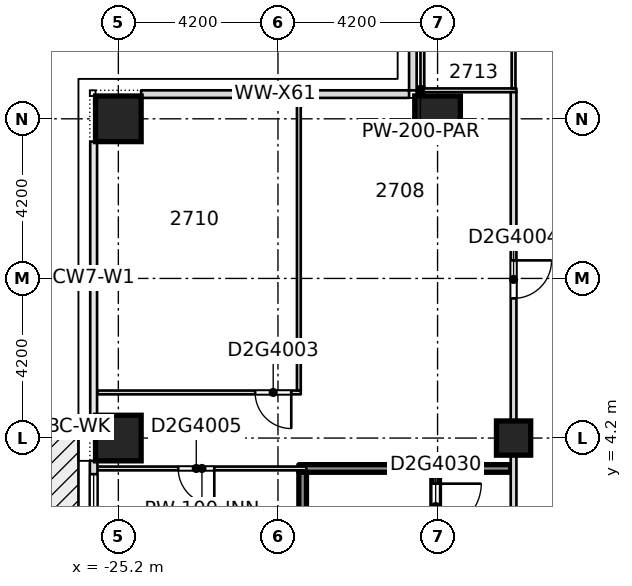
"""IFC4 building model, lengths in metres.
Left out: names, types, materials, properties, quantities, classifications, styles, units other than length and angle.
Written with IfcOpenShell. Run it as: python <this file> out.ifc"""

import sys

from ifc_helpers import new_model, si_unit, direction, frame, frame_2d, origin, origin_2d, place, context, subcontext, project, spatial, rectangle, extrude, element, fill, save


model = new_model("IFC4")
c1 = context("Model", 3, precision=1e-05, world=origin(), true_north=direction((0.0, 1.0)))
c2 = subcontext(c1, "Body", "Model", "MODEL_VIEW")
j1 = project(units=[si_unit("LENGTHUNIT", "METRE"), si_unit("PLANEANGLEUNIT", "RADIAN")], contexts=[c1])
p1 = place(None, origin())
s1 = spatial("IfcSite", under=j1, at=p1, CompositionType="ELEMENT")
p2 = place(p1, origin())
s2 = spatial("IfcBuilding", under=s1, at=p2, CompositionType="ELEMENT")
p3 = place(p2, frame((0.0, 0.0, 108.0)))
s3 = spatial("IfcBuildingStorey", under=s2, at=p3, CompositionType="ELEMENT", Elevation=108.0)
for number, where, z_axis, x_axis in (
    (1, (-25.2, 4.2, -0.32), (0.0, 0.0, 1.0), (1.0, 0.0, 0.0)),
    (2, (-25.2, 12.6, -0.32), (0.0, 0.0, 1.0), (1.0, 0.0, 0.0)),
    (3, (-16.8, 12.6, -0.32), (0.0, 0.0, 1.0), (1.0, 0.0, 0.0)),
):
    element("IfcColumn", number, at=place(p3, frame(where, z_axis=z_axis, x_axis=x_axis)), inside=s3, PredefinedType="COLUMN", context=c2, shape_type="SweptSolid", body=[
        extrude(rectangle(XDim=1.2, YDim=1.2, at=origin_2d()), origin(), (0.0, 0.0, 1.0), 3.45),
    ])
p4 = place(p3, frame((-14.8, 4.2, -0.32), z_axis=(0.0, 0.0, 1.0), x_axis=(1.0, 0.0, 0.0)))
e4 = element("IfcColumn", 4, at=p4, inside=s3, PredefinedType="COLUMN", context=c2, shape_type="SweptSolid", body=[
    extrude(rectangle(XDim=0.9, YDim=0.9, at=origin_2d()), origin(), (0.0, 0.0, 1.0), 3.45),
])
p5 = place(p3, frame((-25.75, 3.4, 0.0), z_axis=(0.0, 0.0, 1.0), x_axis=(1.0, 0.0, 0.0)))
e5 = element("IfcWall", 5, at=p5, inside=s3, PredefinedType="PARTITIONING", context=c2, shape_type="SweptSolid", body=[
    extrude(rectangle(XDim=5.5, YDim=0.1, at=frame_2d((2.75, 0.0))), origin(), (0.0, 0.0, 1.0), 3.13),
])
p6 = place(p5, frame((2.125, 0.0, 0.0)))
e6 = element("IfcOpeningElement", 6, at=p6, cuts=e5, PredefinedType="OPENING", context=c2, shape_type="SweptSolid", body=[
    extrude(rectangle(XDim=0.95, YDim=2.1, at=frame_2d((0.475, 1.05))), frame((0.0, 0.06, 0.0), z_axis=(0.0, -1.0, 0.0), x_axis=(1.0, 0.0, 0.0)), (0.0, 0.0, 1.0), 0.12),
])
p7 = place(p3, frame((-20.45, 3.4, 0.0), z_axis=(0.0, 0.0, 1.0), x_axis=(1.0, 0.0, 0.0)))
e7 = element("IfcWall", 7, at=p7, inside=s3, PredefinedType="SOLIDWALL", context=c2, shape_type="SweptSolid", body=[
    extrude(rectangle(XDim=5.575, YDim=0.2, at=frame_2d((2.788, 0.0))), origin(), (0.0, 0.0, 1.0), 3.13),
])
p8 = place(p3, frame((-25.75, 5.4, 0.0), z_axis=(0.0, 0.0, 1.0), x_axis=(1.0, 0.0, 0.0)))
e8 = element("IfcWall", 8, at=p8, inside=s3, PredefinedType="PARTITIONING", context=c2, shape_type="SweptSolid", body=[
    extrude(rectangle(XDim=5.35, YDim=0.1, at=frame_2d((2.675, 0.0))), origin(), (0.0, 0.0, 1.0), 3.13),
])
p9 = place(p8, frame((4.15, 0.0, 0.0)))
e9 = element("IfcOpeningElement", 9, at=p9, cuts=e8, PredefinedType="OPENING", context=c2, shape_type="SweptSolid", body=[
    extrude(rectangle(XDim=0.95, YDim=2.1, at=frame_2d((0.475, 1.05))), frame((0.0, 0.06, 0.0), z_axis=(0.0, -1.0, 0.0), x_axis=(1.0, 0.0, 0.0)), (0.0, 0.0, 1.0), 0.12),
])
p10 = place(p3, frame((-17.35, 13.35, 0.0), z_axis=(0.0, 0.0, 1.0), x_axis=(1.0, 0.0, 0.0)))
e10 = element("IfcWall", 10, at=p10, inside=s3, PredefinedType="PARTITIONING", context=c2, shape_type="SweptSolid", body=[
    extrude(rectangle(XDim=0.2, YDim=0.2, at=frame_2d((0.1, 0.0))), origin(), (0.0, 0.0, 1.0), 3.13),
])
p11 = place(p3, frame((-17.25, 13.35, 0.0), z_axis=(0.0, 0.0, 1.0), x_axis=(1.0, 0.0, 0.0)))
e11 = element("IfcWall", 11, at=p11, inside=s3, PredefinedType="PARTITIONING", context=c2, shape_type="SweptSolid", body=[
    extrude(rectangle(XDim=2.525, YDim=0.1, at=frame_2d((1.262, 0.0))), origin(), (0.0, 0.0, 1.0), 3.13),
])
p12 = place(p3, frame((-20.45, 5.45, 0.0), z_axis=(0.0, 0.0, 1.0), x_axis=(0.0, 1.0, 0.0)))
e12 = element("IfcWall", 12, at=p12, inside=s3, PredefinedType="PARTITIONING", context=c2, shape_type="SweptSolid", body=[
    extrude(rectangle(XDim=7.7, YDim=0.1, at=frame_2d((3.85, 0.0))), origin(), (0.0, 0.0, 1.0), 3.13),
])
p13 = place(p3, frame((-17.2, 13.45, 0.0), z_axis=(0.0, 0.0, 1.0), x_axis=(0.0, 1.0, 0.0)))
e13 = element("IfcWall", 13, at=p13, inside=s3, PredefinedType="PARTITIONING", context=c2, shape_type="SweptSolid", body=[
    extrude(rectangle(XDim=1.65, YDim=0.1, at=frame_2d((0.825, 0.0))), origin(), (0.0, 0.0, 1.0), 3.13),
])
p14 = place(p3, frame((-16.85, -3.3, 0.0), z_axis=(0.0, 0.0, 1.0), x_axis=(0.0, 1.0, 0.0)))
e14 = element("IfcWall", 14, at=p14, inside=s3, PredefinedType="SOLIDWALL", context=c2, shape_type="SweptSolid", body=[
    extrude(rectangle(XDim=6.6, YDim=0.2, at=frame_2d((3.3, 0.0))), origin(), (0.0, 0.0, 1.0), 3.13),
])
p15 = place(p14, frame((5.1, 0.0, 0.0)))
e15 = element("IfcOpeningElement", 15, at=p15, cuts=e14, PredefinedType="OPENING", context=c2, shape_type="SweptSolid", body=[
    extrude(rectangle(XDim=1.2, YDim=2.1, at=frame_2d((0.6, 1.05))), frame((0.0, 0.11, 0.0), z_axis=(0.0, -1.0, 0.0), x_axis=(1.0, 0.0, 0.0)), (0.0, 0.0, 1.0), 0.22),
])
p16 = place(p3, frame((-14.8, -5.223, 0.0), z_axis=(0.0, 0.0, 1.0), x_axis=(0.0, 1.0, 0.0)))
e16 = element("IfcWall", 16, at=p16, inside=s3, PredefinedType="PARTITIONING", context=c2, shape_type="SweptSolid", body=[
    extrude(rectangle(XDim=18.523, YDim=0.15, at=frame_2d((9.261, 0.0))), origin(), (0.0, 0.0, 1.0), 3.13),
])
p17 = place(p16, frame((13.098, 0.0, 0.0)))
e17 = element("IfcOpeningElement", 17, at=p17, cuts=e16, PredefinedType="OPENING", context=c2, shape_type="SweptSolid", body=[
    extrude(rectangle(XDim=1.0, YDim=2.1, at=frame_2d((0.5, 1.05))), frame((0.0, 0.085, 0.0), z_axis=(0.0, -1.0, 0.0), x_axis=(1.0, 0.0, 0.0)), (0.0, 0.0, 1.0), 0.17),
])
p18 = place(p16, frame((4.673, 0.0, 0.0)))
e18 = element("IfcOpeningElement", 18, at=p18, cuts=e16, PredefinedType="OPENING", context=c2, shape_type="SweptSolid", body=[
    extrude(rectangle(XDim=1.1, YDim=2.1, at=frame_2d((0.55, 1.05))), frame((0.0, 0.085, 0.0), z_axis=(0.0, -1.0, 0.0), x_axis=(1.0, 0.0, 0.0)), (0.0, 0.0, 1.0), 0.17),
])
p19 = place(p3, frame((-14.8, 13.4, 0.0), z_axis=(0.0, 0.0, 1.0), x_axis=(0.0, 1.0, 0.0)))
e19 = element("IfcWall", 19, at=p19, inside=s3, PredefinedType="PARTITIONING", context=c2, shape_type="SweptSolid", body=[
    extrude(rectangle(XDim=1.7, YDim=0.1, at=frame_2d((0.85, 0.0))), origin(), (0.0, 0.0, 1.0), 3.13),
])
p20 = place(p3, frame((-17.45, 20.4, 0.0), z_axis=(0.0, 0.0, 1.0), x_axis=(0.0, -1.0, 0.0)))
e20 = element("IfcWall", 20, at=p20, inside=s3, PredefinedType="STANDARD", context=c2, shape_type="SweptSolid", body=[
    extrude(rectangle(XDim=7.05, YDim=0.2, at=frame_2d((3.525, 0.0))), origin(), (0.0, 0.0, 1.0), 3.13),
])
p21 = place(p20, frame((3.875, 0.0, 0.2)))
e21 = element("IfcOpeningElement", 21, at=p21, cuts=e20, PredefinedType="OPENING", context=c2, shape_type="SweptSolid", body=[
    extrude(rectangle(XDim=1.8, YDim=2.65, at=frame_2d((0.9, 1.325))), frame((0.0, 0.11, 0.0), z_axis=(0.0, -1.0, 0.0), x_axis=(1.0, 0.0, 0.0)), (0.0, 0.0, 1.0), 0.22),
])
p22 = place(p20, frame((0.35, 0.0, 0.2)))
e22 = element("IfcOpeningElement", 22, at=p22, cuts=e20, PredefinedType="OPENING", context=c2, shape_type="SweptSolid", body=[
    extrude(rectangle(XDim=1.8, YDim=2.65, at=frame_2d((0.9, 1.325))), frame((0.0, 0.11, 0.0), z_axis=(0.0, -1.0, 0.0), x_axis=(1.0, 0.0, 0.0)), (0.0, 0.0, 1.0), 0.22),
])
p23 = place(p3, frame((-17.55, 13.25, 0.0), z_axis=(0.0, 0.0, 1.0), x_axis=(-1.0, 0.0, 0.0)))
e23 = element("IfcWall", 23, at=p23, inside=s3, PredefinedType="STANDARD", context=c2, shape_type="SweptSolid", body=[
    extrude(rectangle(XDim=7.05, YDim=0.2, at=frame_2d((3.525, 0.0))), origin(), (0.0, 0.0, 1.0), 3.13),
])
p24 = place(p3, frame((-25.85, 3.6, 0.0), z_axis=(0.0, 0.0, 1.0), x_axis=(0.0, -1.0, 0.0)))
e24 = element("IfcWall", 24, at=p24, inside=s3, PredefinedType="STANDARD", context=c2, shape_type="SweptSolid", body=[
    extrude(rectangle(XDim=7.2, YDim=0.2, at=frame_2d((3.6, 0.0))), origin(), (0.0, 0.0, 1.0), 3.13),
])
p25 = place(p24, frame((3.95, 0.0, 0.2)))
e25 = element("IfcOpeningElement", 25, at=p25, cuts=e24, PredefinedType="OPENING", context=c2, shape_type="SweptSolid", body=[
    extrude(rectangle(XDim=1.8, YDim=2.65, at=frame_2d((0.9, 1.325))), frame((0.0, 0.11, 0.0), z_axis=(0.0, -1.0, 0.0), x_axis=(1.0, 0.0, 0.0)), (0.0, 0.0, 1.0), 0.22),
])
p26 = place(p24, frame((5.85, 0.0, 0.0)))
e26 = element("IfcOpeningElement", 26, at=p26, cuts=e24, PredefinedType="OPENING", context=c2, shape_type="SweptSolid", body=[
    extrude(rectangle(XDim=1.0, YDim=2.4, at=frame_2d((0.5, 1.2))), frame((0.0, 0.11, 0.0), z_axis=(0.0, -1.0, 0.0), x_axis=(1.0, 0.0, 0.0)), (0.0, 0.0, 1.0), 0.22),
])
p27 = place(p24, frame((0.35, 0.0, 0.2)))
e27 = element("IfcOpeningElement", 27, at=p27, cuts=e24, PredefinedType="OPENING", context=c2, shape_type="SweptSolid", body=[
    extrude(rectangle(XDim=1.8, YDim=2.65, at=frame_2d((0.9, 1.325))), frame((0.0, 0.11, 0.0), z_axis=(0.0, -1.0, 0.0), x_axis=(1.0, 0.0, 0.0)), (0.0, 0.0, 1.0), 0.22),
])
p28 = place(p24, frame((2.25, 0.0, 0.0)))
e28 = element("IfcOpeningElement", 28, at=p28, cuts=e24, PredefinedType="OPENING", context=c2, shape_type="SweptSolid", body=[
    extrude(rectangle(XDim=1.0, YDim=2.4, at=frame_2d((0.5, 1.2))), frame((0.0, 0.11, 0.0), z_axis=(0.0, -1.0, 0.0), x_axis=(1.0, 0.0, 0.0)), (0.0, 0.0, 1.0), 0.22),
])
p29 = place(p3, frame((-20.35, -3.298, 0.0), z_axis=(0.0, 0.0, 1.0), x_axis=(0.0, 1.0, 0.0)))
e29 = element("IfcWall", 29, at=p29, inside=s3, PredefinedType="SOLIDWALL", context=c2, shape_type="SweptSolid", body=[
    extrude(rectangle(XDim=6.598, YDim=0.2, at=frame_2d((3.299, 0.0))), origin(), (0.0, 0.0, 1.0), 3.13),
])
p30 = place(p9, origin())
e30 = element("IfcDoor", 30, at=p30, inside=s3, OperationType="SINGLE_SWING_LEFT", PredefinedType="DOOR", context=c2, shape_type="SweptSolid", body=[
    extrude(rectangle(XDim=0.95, YDim=2.1, at=frame_2d((0.475, 1.05))), frame((0.0, 0.025, 0.0), z_axis=(0.0, -1.0, 0.0), x_axis=(1.0, 0.0, 0.0)), (0.0, 0.0, 1.0), 0.05),
])
fill(e9, e30)
p31 = place(p17, origin())
e31 = element("IfcDoor", 31, at=p31, inside=s3, OperationType="SINGLE_SWING_LEFT", PredefinedType="DOOR", context=c2, shape_type="SweptSolid", body=[
    extrude(rectangle(XDim=1.0, YDim=2.1, at=frame_2d((0.5, 1.05))), frame((0.0, 0.025, 0.0), z_axis=(0.0, -1.0, 0.0), x_axis=(1.0, 0.0, 0.0)), (0.0, 0.0, 1.0), 0.05),
])
fill(e17, e31)
p32 = place(p6, origin())
e32 = element("IfcDoor", 32, at=p32, inside=s3, OperationType="SINGLE_SWING_LEFT", PredefinedType="DOOR", context=c2, shape_type="SweptSolid", body=[
    extrude(rectangle(XDim=0.95, YDim=2.1, at=frame_2d((0.475, 1.05))), frame((0.0, 0.025, 0.0), z_axis=(0.0, -1.0, 0.0), x_axis=(1.0, 0.0, 0.0)), (0.0, 0.0, 1.0), 0.05),
])
fill(e6, e32)
p33 = place(p15, origin())
e33 = element("IfcDoor", 33, at=p33, inside=s3, OperationType="SINGLE_SWING_RIGHT", PredefinedType="DOOR", context=c2, shape_type="SweptSolid", body=[
    extrude(rectangle(XDim=1.2, YDim=2.1, at=frame_2d((0.6, 1.05))), frame((0.0, 0.025, 0.0), z_axis=(0.0, -1.0, 0.0), x_axis=(1.0, 0.0, 0.0)), (0.0, 0.0, 1.0), 0.05),
])
fill(e15, e33)
p34 = place(p27, origin())
e34 = element("IfcWindow", 34, at=p34, inside=s3, PartitioningType="SINGLE_PANEL", PredefinedType="WINDOW", context=c2, shape_type="SweptSolid", body=[
    extrude(rectangle(XDim=1.8, YDim=2.65, at=frame_2d((0.9, 1.325))), frame((0.0, 0.03, 0.0), z_axis=(0.0, -1.0, 0.0), x_axis=(1.0, 0.0, 0.0)), (0.0, 0.0, 1.0), 0.06),
])
fill(e27, e34)
save(model, sys.argv[1])
